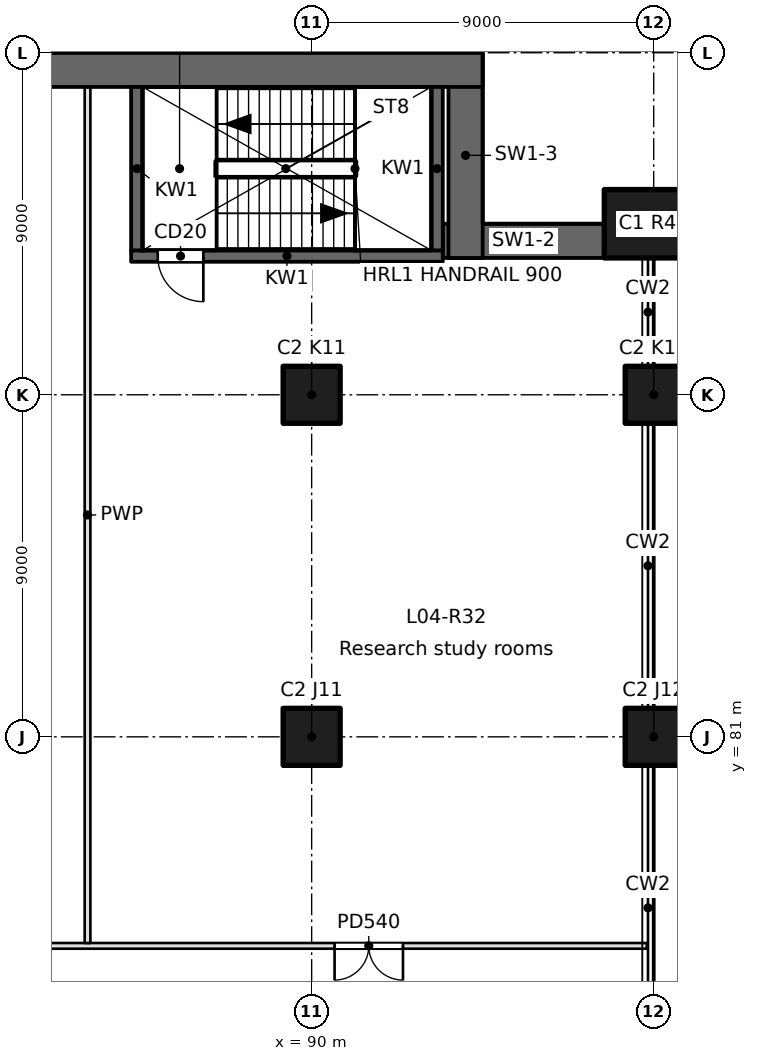
"""IFC4 building model, lengths in metres.
Left out: names, types, materials, properties, quantities, classifications, styles, units other than length and angle.
Written with IfcOpenShell. Run it as: python <this file> out.ifc"""

import sys

from ifc_helpers import new_model, si_unit, direction, frame, frame_2d, origin, origin_2d, place, context, subcontext, project, spatial, rectangle, extrude, element, fill, save


model = new_model("IFC4")
c1 = context("Model", 3, precision=1e-05, world=origin(), true_north=direction((0.0, 1.0)))
c2 = subcontext(c1, "Body", "Model", "MODEL_VIEW")
j1 = project(units=[si_unit("LENGTHUNIT", "METRE"), si_unit("PLANEANGLEUNIT", "RADIAN")], contexts=[c1])
p1 = place(None, origin())
s1 = spatial("IfcSite", under=j1, at=p1, CompositionType="ELEMENT")
p2 = place(p1, origin())
s2 = spatial("IfcBuilding", under=s1, at=p2, CompositionType="ELEMENT")
p3 = place(p2, frame((0.0, 0.0, 21.6)))
s3 = spatial("IfcBuildingStorey", under=s2, at=p3, CompositionType="ELEMENT", Elevation=21.6)
for number, where, z_axis, x_axis in (
    (1, (99.0, 81.0, 0.0), (0.0, 0.0, 1.0), (1.0, 0.0, 0.0)),
    (2, (99.0, 90.0, 0.0), (0.0, 0.0, 1.0), (1.0, 0.0, 0.0)),
):
    element("IfcColumn", number, at=place(p3, frame(where, z_axis=z_axis, x_axis=x_axis)), inside=s3, PredefinedType="COLUMN", context=c2, shape_type="SweptSolid", body=[
        extrude(rectangle(XDim=1.5, YDim=1.5, at=origin_2d()), origin(), (0.0, 0.0, 1.0), 4.8),
    ])
p4 = place(p3, frame((99.0, 94.5, 0.0), z_axis=(0.0, 0.0, 1.0), x_axis=(1.0, 0.0, 0.0)))
e3 = element("IfcColumn", 3, at=p4, inside=s3, PredefinedType="COLUMN", context=c2, shape_type="SweptSolid", body=[
    extrude(rectangle(XDim=2.6, YDim=1.8, at=origin_2d()), origin(), (0.0, 0.0, 1.0), 4.8),
])
for number, where, z_axis, x_axis in (
    (4, (90.0, 81.0, 0.0), (0.0, 0.0, 1.0), (1.0, 0.0, 0.0)),
    (5, (90.0, 90.0, 0.0), (0.0, 0.0, 1.0), (1.0, 0.0, 0.0)),
):
    element("IfcColumn", number, at=place(p3, frame(where, z_axis=z_axis, x_axis=x_axis)), inside=s3, PredefinedType="COLUMN", context=c2, shape_type="SweptSolid", body=[
        extrude(rectangle(XDim=1.5, YDim=1.5, at=origin_2d()), origin(), (0.0, 0.0, 1.0), 4.8),
    ])
p5 = place(p3, frame((97.7, 94.05, 0.0), z_axis=(0.0, 0.0, 1.0), x_axis=(-1.0, 0.0, 0.0)))
e6 = element("IfcWall", 6, at=p5, inside=s3, PredefinedType="SHEAR", context=c2, shape_type="SweptSolid", body=[
    extrude(rectangle(XDim=4.25, YDim=0.9, at=frame_2d((2.125, 0.0))), origin(), (0.0, 0.0, 1.0), 4.8),
])
p6 = place(p3, frame((94.05, 93.6, 0.0), z_axis=(0.0, 0.0, 1.0), x_axis=(0.0, 1.0, 0.0)))
e7 = element("IfcWall", 7, at=p6, inside=s3, PredefinedType="SHEAR", context=c2, shape_type="SweptSolid", body=[
    extrude(rectangle(XDim=5.4, YDim=0.9, at=frame_2d((2.7, 0.0))), origin(), (0.0, 0.0, 1.0), 4.8),
])
p7 = place(p3, frame((94.5, 98.55, 0.0), z_axis=(0.0, 0.0, 1.0), x_axis=(-1.0, 0.0, 0.0)))
e8 = element("IfcWall", 8, at=p7, inside=s3, PredefinedType="SHEAR", context=c2, shape_type="SweptSolid", body=[
    extrude(rectangle(XDim=90.0, YDim=0.9, at=frame_2d((45.0, 0.0))), origin(), (0.0, 0.0, 1.0), 4.8),
])
p8 = place(p3, frame((85.25, 93.65, -0.35), z_axis=(0.0, 0.0, 1.0), x_axis=(1.0, 0.0, 0.0)))
e9 = element("IfcWall", 9, at=p8, inside=s3, PredefinedType="SOLIDWALL", context=c2, shape_type="SweptSolid", body=[
    extrude(rectangle(XDim=8.2, YDim=0.3, at=frame_2d((4.1, 0.0))), origin(), (0.0, 0.0, 1.0), 4.8),
])
p9 = place(p8, frame((0.7, 0.0, 0.35)))
e10 = element("IfcOpeningElement", 10, at=p9, cuts=e9, PredefinedType="OPENING", context=c2, shape_type="SweptSolid", body=[
    extrude(rectangle(XDim=1.2, YDim=2.1, at=frame_2d((0.6, 1.05))), frame((0.0, 0.15, 0.0), z_axis=(0.0, -1.0, 0.0), x_axis=(1.0, 0.0, 0.0)), (0.0, 0.0, 1.0), 0.3),
])
for number, where, z_axis, x_axis in (
    (11, (85.4, 93.8, -0.35), (0.0, 0.0, 1.0), (0.0, 1.0, 0.0)),
    (12, (93.3, 93.8, -0.35), (0.0, 0.0, 1.0), (0.0, 1.0, 0.0)),
):
    element("IfcWall", number, at=place(p3, frame(where, z_axis=z_axis, x_axis=x_axis)), inside=s3, PredefinedType="SOLIDWALL", context=c2, shape_type="SweptSolid", body=[
        extrude(rectangle(XDim=4.3, YDim=0.3, at=frame_2d((2.15, 0.0))), origin(), (0.0, 0.0, 1.0), 4.8),
    ])
p10 = place(p3, frame((98.82, 75.5, 0.0), z_axis=(0.0, 0.0, 1.0), x_axis=(-1.0, 0.0, 0.0)))
e13 = element("IfcWall", 13, at=p10, inside=s3, PredefinedType="PARTITIONING", context=c2, shape_type="SweptSolid", body=[
    extrude(rectangle(XDim=52.945, YDim=0.15, at=frame_2d((26.473, 0.0))), origin(), (0.0, 0.0, 1.0), 4.45),
])
p11 = place(p10, frame((46.695, 0.0, 0.0)))
e14 = element("IfcOpeningElement", 14, at=p11, cuts=e13, PredefinedType="OPENING", context=c2, shape_type="SweptSolid", body=[
    extrude(rectangle(XDim=1.0, YDim=2.1, at=frame_2d((0.5, 1.05))), frame((0.0, 0.075, 0.0), z_axis=(0.0, -1.0, 0.0), x_axis=(1.0, 0.0, 0.0)), (0.0, 0.0, 1.0), 0.15),
])
p12 = place(p10, frame((32.406, 0.0, 0.0)))
e15 = element("IfcOpeningElement", 15, at=p12, cuts=e13, PredefinedType="OPENING", context=c2, shape_type="SweptSolid", body=[
    extrude(rectangle(XDim=1.0, YDim=2.1, at=frame_2d((0.5, 1.05))), frame((0.0, 0.075, 0.0), z_axis=(0.0, -1.0, 0.0), x_axis=(1.0, 0.0, 0.0)), (0.0, 0.0, 1.0), 0.15),
])
p13 = place(p10, frame((19.148, 0.0, 0.0)))
e16 = element("IfcOpeningElement", 16, at=p13, cuts=e13, PredefinedType="OPENING", context=c2, shape_type="SweptSolid", body=[
    extrude(rectangle(XDim=1.0, YDim=2.1, at=frame_2d((0.5, 1.05))), frame((0.0, 0.075, 0.0), z_axis=(0.0, -1.0, 0.0), x_axis=(1.0, 0.0, 0.0)), (0.0, 0.0, 1.0), 0.15),
])
p14 = place(p10, frame((6.417, 0.0, 0.0)))
e17 = element("IfcOpeningElement", 17, at=p14, cuts=e13, PredefinedType="OPENING", context=c2, shape_type="SweptSolid", body=[
    extrude(rectangle(XDim=1.8, YDim=2.1, at=frame_2d((0.9, 1.05))), frame((0.0, 0.075, 0.0), z_axis=(0.0, -1.0, 0.0), x_axis=(1.0, 0.0, 0.0)), (0.0, 0.0, 1.0), 0.15),
])
p15 = place(p3, frame((84.103, 75.575, 0.0), z_axis=(0.0, 0.0, 1.0), x_axis=(0.0, 1.0, 0.0)))
e18 = element("IfcWall", 18, at=p15, inside=s3, PredefinedType="PARTITIONING", context=c2, shape_type="SweptSolid", body=[
    extrude(rectangle(XDim=22.525, YDim=0.15, at=frame_2d((11.263, 0.0))), origin(), (0.0, 0.0, 1.0), 4.45),
])
p16 = place(p9, frame((1.2, 0.0, 0.0), z_axis=(0.0, 0.0, 1.0), x_axis=(-1.0, 0.0, 0.0)))
e19 = element("IfcDoor", 19, at=p16, inside=s3, OperationType="SINGLE_SWING_LEFT", PredefinedType="DOOR", context=c2, shape_type="SweptSolid", body=[
    extrude(rectangle(XDim=1.2, YDim=2.1, at=frame_2d((0.6, 1.05))), frame((0.0, 0.025, 0.0), z_axis=(0.0, -1.0, 0.0), x_axis=(1.0, 0.0, 0.0)), (0.0, 0.0, 1.0), 0.05),
])
fill(e10, e19)
p17 = place(p14, origin())
e20 = element("IfcDoor", 20, at=p17, inside=s3, OperationType="DOUBLE_DOOR_SINGLE_SWING", PredefinedType="DOOR", context=c2, shape_type="SweptSolid", body=[
    extrude(rectangle(XDim=1.8, YDim=2.1, at=frame_2d((0.9, 1.05))), frame((0.0, 0.025, 0.0), z_axis=(0.0, -1.0, 0.0), x_axis=(1.0, 0.0, 0.0)), (0.0, 0.0, 1.0), 0.05),
])
fill(e17, e20)
save(model, sys.argv[1])
